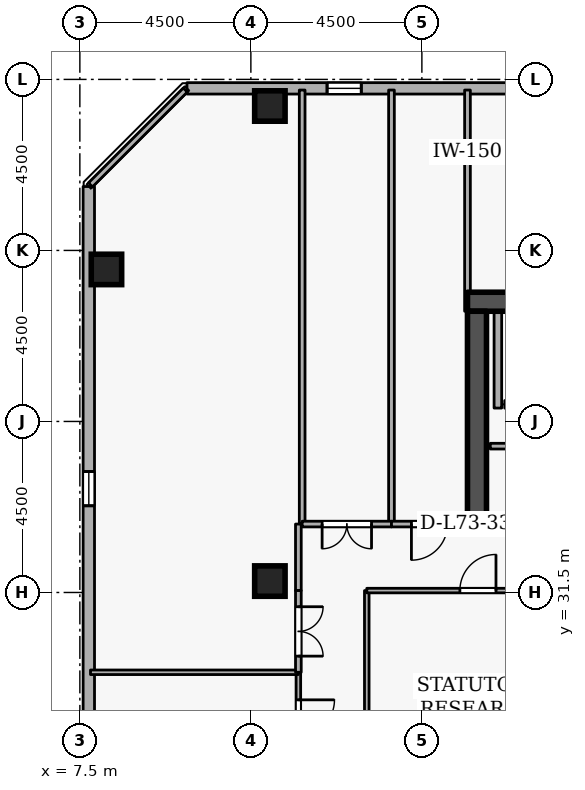
"""IFC4 building model, lengths in metres.
Left out: names, types, materials, properties, quantities, classifications, styles, units other than length and angle.
Written with IfcOpenShell. Run it as: python <this file> out.ifc"""

import sys

from ifc_helpers import new_model, si_unit, direction, frame, frame_2d, origin, origin_2d, place, context, subcontext, project, spatial, rectangle, extrude, element, fill, save


model = new_model("IFC4")
c1 = context("Model", 3, precision=1e-05, world=origin(), true_north=direction((0.0, 1.0)))
c2 = subcontext(c1, "Body", "Model", "MODEL_VIEW")
j1 = project(units=[si_unit("LENGTHUNIT", "METRE"), si_unit("PLANEANGLEUNIT", "RADIAN")], contexts=[c1])
p1 = place(None, origin())
s1 = spatial("IfcSite", under=j1, at=p1, CompositionType="ELEMENT")
p2 = place(p1, origin())
s2 = spatial("IfcBuilding", under=s1, at=p2, CompositionType="ELEMENT")
p3 = place(p2, frame((0.0, 0.0, 272.7)))
s3 = spatial("IfcBuildingStorey", under=s2, at=p3, CompositionType="ELEMENT", Elevation=272.7)
p4 = place(p3, frame((17.7, 39.15, 0.0), z_axis=(0.0, 0.0, 1.0), x_axis=(1.0, 0.0, 0.0)))
e1 = element("IfcWall", 1, at=p4, inside=s3, PredefinedType="SHEAR", context=c2, shape_type="SweptSolid", body=[
    extrude(rectangle(XDim=15.6, YDim=0.5, at=frame_2d((7.8, 0.0))), origin(), (0.0, 0.0, 1.0), 3.6),
])
p5 = place(p3, frame((17.95, 33.1, 0.0), z_axis=(0.0, 0.0, 1.0), x_axis=(0.0, 1.0, 0.0)))
e2 = element("IfcWall", 2, at=p5, inside=s3, PredefinedType="SHEAR", context=c2, shape_type="SweptSolid", body=[
    extrude(rectangle(XDim=5.8, YDim=0.5, at=frame_2d((2.9, 0.0))), origin(), (0.0, 0.0, 1.0), 3.6),
])
for number, where, z_axis, x_axis in (
    (3, (12.5, 44.3, 0.0), (0.0, 0.0, 1.0), (1.0, 0.0, 0.0)),
    (4, (8.2, 40.0, 0.0), (0.0, 0.0, 1.0), (1.0, 0.0, 0.0)),
    (5, (12.5, 31.8, 0.0), (0.0, 0.0, 1.0), (1.0, 0.0, 0.0)),
):
    element("IfcColumn", number, at=place(p3, frame(where, z_axis=z_axis, x_axis=x_axis)), inside=s3, PredefinedType="COLUMN", context=c2, shape_type="SweptSolid", body=[
        extrude(rectangle(XDim=0.8, YDim=0.8, at=origin_2d()), origin(), (0.0, 0.0, 1.0), 3.6),
    ])
p6 = place(p3, frame((46.406, 44.764, 0.0), z_axis=(0.0, 0.0, 1.0), x_axis=(-0.999999999634, 2.7061402e-05, 0.0)))
e6 = element("IfcWall", 6, at=p6, inside=s3, PredefinedType="STANDARD", context=c2, shape_type="SweptSolid", body=[
    extrude(rectangle(XDim=36.087, YDim=0.3, at=frame_2d((18.043, 0.0))), origin(), (0.0, 0.0, 1.0), 2.7),
])
p7 = place(p6, frame((2.7, 0.0, 0.72)))
e7 = element("IfcOpeningElement", 7, at=p7, cuts=e6, PredefinedType="OPENING", context=c2, shape_type="SweptSolid", body=[
    extrude(rectangle(XDim=0.9, YDim=1.75, at=frame_2d((0.45, 0.875))), frame((0.0, 0.16, 0.0), z_axis=(0.0, -1.0, 0.0), x_axis=(1.0, 0.0, 0.0)), (0.0, 0.0, 1.0), 0.32),
])
p8 = place(p6, frame((12.3, 0.0, 0.72)))
e8 = element("IfcOpeningElement", 8, at=p8, cuts=e6, PredefinedType="OPENING", context=c2, shape_type="SweptSolid", body=[
    extrude(rectangle(XDim=0.9, YDim=1.75, at=frame_2d((0.45, 0.875))), frame((0.0, 0.16, 0.0), z_axis=(0.0, -1.0, 0.0), x_axis=(1.0, 0.0, 0.0)), (0.0, 0.0, 1.0), 0.32),
])
p9 = place(p6, frame((17.1, 0.0, 0.72)))
e9 = element("IfcOpeningElement", 9, at=p9, cuts=e6, PredefinedType="OPENING", context=c2, shape_type="SweptSolid", body=[
    extrude(rectangle(XDim=0.9, YDim=1.75, at=frame_2d((0.45, 0.875))), frame((0.0, 0.16, 0.0), z_axis=(0.0, -1.0, 0.0), x_axis=(1.0, 0.0, 0.0)), (0.0, 0.0, 1.0), 0.32),
])
p10 = place(p6, frame((26.7, 0.0, 0.72)))
e10 = element("IfcOpeningElement", 10, at=p10, cuts=e6, PredefinedType="OPENING", context=c2, shape_type="SweptSolid", body=[
    extrude(rectangle(XDim=0.9, YDim=1.75, at=frame_2d((0.45, 0.875))), frame((0.0, 0.16, 0.0), z_axis=(0.0, -1.0, 0.0), x_axis=(1.0, 0.0, 0.0)), (0.0, 0.0, 1.0), 0.32),
])
p11 = place(p6, frame((31.5, 0.0, 0.72)))
e11 = element("IfcOpeningElement", 11, at=p11, cuts=e6, PredefinedType="OPENING", context=c2, shape_type="SweptSolid", body=[
    extrude(rectangle(XDim=0.9, YDim=1.75, at=frame_2d((0.45, 0.875))), frame((0.0, 0.16, 0.0), z_axis=(0.0, -1.0, 0.0), x_axis=(1.0, 0.0, 0.0)), (0.0, 0.0, 1.0), 0.32),
])
p12 = place(p3, frame((7.735, 42.181, 0.0), z_axis=(0.0, 0.0, 1.0), x_axis=(2.7061402e-05, -0.999999999634, 0.0)))
e12 = element("IfcWall", 12, at=p12, inside=s3, PredefinedType="STANDARD", context=c2, shape_type="SweptSolid", body=[
    extrude(rectangle(XDim=36.087, YDim=0.3, at=frame_2d((18.043, 0.0))), origin(), (0.0, 0.0, 1.0), 2.7),
])
p13 = place(p12, frame((7.5, 0.0, 0.72)))
e13 = element("IfcOpeningElement", 13, at=p13, cuts=e12, PredefinedType="OPENING", context=c2, shape_type="SweptSolid", body=[
    extrude(rectangle(XDim=0.9, YDim=1.75, at=frame_2d((0.45, 0.875))), frame((0.0, 0.16, 0.0), z_axis=(0.0, -1.0, 0.0), x_axis=(1.0, 0.0, 0.0)), (0.0, 0.0, 1.0), 0.32),
])
p14 = place(p12, frame((21.9, 0.0, 0.72)))
e14 = element("IfcOpeningElement", 14, at=p14, cuts=e12, PredefinedType="OPENING", context=c2, shape_type="SweptSolid", body=[
    extrude(rectangle(XDim=0.9, YDim=1.75, at=frame_2d((0.45, 0.875))), frame((0.0, 0.16, 0.0), z_axis=(0.0, -1.0, 0.0), x_axis=(1.0, 0.0, 0.0)), (0.0, 0.0, 1.0), 0.32),
])
p15 = place(p12, frame((31.5, 0.0, 0.72)))
e15 = element("IfcOpeningElement", 15, at=p15, cuts=e12, PredefinedType="OPENING", context=c2, shape_type="SweptSolid", body=[
    extrude(rectangle(XDim=0.9, YDim=1.75, at=frame_2d((0.45, 0.875))), frame((0.0, 0.16, 0.0), z_axis=(0.0, -1.0, 0.0), x_axis=(1.0, 0.0, 0.0)), (0.0, 0.0, 1.0), 0.32),
])
p16 = place(p3, frame((20.62, 36.45, 0.0), z_axis=(0.0, 0.0, 1.0), x_axis=(-1.0, 0.0, 0.0)))
e16 = element("IfcWall", 16, at=p16, inside=s3, PredefinedType="STANDARD", context=c2, shape_type="SweptSolid", body=[
    extrude(rectangle(XDim=1.94, YDim=0.2, at=frame_2d((0.97, 0.0))), origin(), (0.0, 0.0, 1.0), 3.34),
])
p17 = place(p16, frame((0.46, 0.0, 0.0)))
e17 = element("IfcOpeningElement", 17, at=p17, cuts=e16, PredefinedType="OPENING", context=c2, shape_type="SweptSolid", body=[
    extrude(rectangle(XDim=1.02, YDim=2.06, at=frame_2d((0.51, 1.03))), frame((0.0, 0.11, 0.0), z_axis=(0.0, -1.0, 0.0), x_axis=(1.0, 0.0, 0.0)), (0.0, 0.0, 1.0), 0.22),
])
p18 = place(p3, frame((18.5, 36.352, 0.0), z_axis=(0.0, 0.0, 1.0), x_axis=(0.0, 1.0, 0.0)))
e18 = element("IfcWall", 18, at=p18, inside=s3, PredefinedType="STANDARD", context=c2, shape_type="SweptSolid", body=[
    extrude(rectangle(XDim=2.536, YDim=0.2, at=frame_2d((1.268, 0.0))), origin(), (0.0, 0.0, 1.0), 3.34),
])
p19 = place(p3, frame((18.3, 33.3, 0.0), z_axis=(0.0, 0.0, 1.0), x_axis=(1.0, 0.0, 0.0)))
e19 = element("IfcWall", 19, at=p19, inside=s3, PredefinedType="PARTITIONING", context=c2, shape_type="SweptSolid", body=[
    extrude(rectangle(XDim=2.25, YDim=0.15, at=frame_2d((1.125, 0.0))), origin(), (0.0, 0.0, 1.0), 3.34),
])
p20 = place(p19, frame((0.665, 0.0, 0.0)))
e20 = element("IfcOpeningElement", 20, at=p20, cuts=e19, PredefinedType="OPENING", context=c2, shape_type="SweptSolid", body=[
    extrude(rectangle(XDim=0.92, YDim=2.08, at=frame_2d((0.46, 1.04))), frame((0.0, 0.085, 0.0), z_axis=(0.0, -1.0, 0.0), x_axis=(1.0, 0.0, 0.0)), (0.0, 0.0, 1.0), 0.17),
])
p21 = place(p3, frame((20.55, 35.35, 0.0), z_axis=(0.0, 0.0, 1.0), x_axis=(-1.0, 0.0, 0.0)))
e21 = element("IfcWall", 21, at=p21, inside=s3, PredefinedType="PARTITIONING", context=c2, shape_type="SweptSolid", body=[
    extrude(rectangle(XDim=2.25, YDim=0.15, at=frame_2d((1.125, 0.0))), origin(), (0.0, 0.0, 1.0), 3.34),
])
for number, where, z_axis, x_axis in (
    (22, (13.35, 33.3, 0.0), (0.0, 0.0, 1.0), (0.0, 1.0, 0.0)),
    (23, (15.7, 44.72, 0.0), (0.0, 0.0, 1.0), (0.0, -1.0, 0.0)),
):
    element("IfcWall", number, at=place(p3, frame(where, z_axis=z_axis, x_axis=x_axis)), inside=s3, PredefinedType="PARTITIONING", context=c2, shape_type="SweptSolid", body=[
        extrude(rectangle(XDim=11.42, YDim=0.15, at=frame_2d((5.71, 0.0))), origin(), (0.0, 0.0, 1.0), 3.34),
    ])
p22 = place(p3, frame((15.7, 33.3, 0.0), z_axis=(0.0, 0.0, 1.0), x_axis=(-1.0, 0.0, 0.0)))
e24 = element("IfcWall", 24, at=p22, inside=s3, PredefinedType="PARTITIONING", context=c2, shape_type="SweptSolid", body=[
    extrude(rectangle(XDim=2.35, YDim=0.15, at=frame_2d((1.175, 0.0))), origin(), (0.0, 0.0, 1.0), 3.34),
])
p23 = place(p22, frame((0.525, 0.0, 0.0)))
e25 = element("IfcOpeningElement", 25, at=p23, cuts=e24, PredefinedType="OPENING", context=c2, shape_type="SweptSolid", body=[
    extrude(rectangle(XDim=1.3, YDim=2.12, at=frame_2d((0.65, 1.06))), frame((0.0, 0.085, 0.0), z_axis=(0.0, -1.0, 0.0), x_axis=(1.0, 0.0, 0.0)), (0.0, 0.0, 1.0), 0.17),
])
p24 = place(p3, frame((17.7, 44.72, 0.0), z_axis=(0.0, 0.0, 1.0), x_axis=(0.0, -1.0, 0.0)))
e26 = element("IfcWall", 26, at=p24, inside=s3, PredefinedType="PARTITIONING", context=c2, shape_type="SweptSolid", body=[
    extrude(rectangle(XDim=5.82, YDim=0.15, at=frame_2d((2.91, 0.0))), origin(), (0.0, 0.0, 1.0), 2.545),
])
p25 = place(p3, frame((17.7, 33.3, 0.0), z_axis=(0.0, 0.0, 1.0), x_axis=(-1.0, 0.0, 0.0)))
e27 = element("IfcWall", 27, at=p25, inside=s3, PredefinedType="PARTITIONING", context=c2, shape_type="SweptSolid", body=[
    extrude(rectangle(XDim=2.0, YDim=0.15, at=frame_2d((1.0, 0.0))), origin(), (0.0, 0.0, 1.0), 3.34),
])
p26 = place(p25, frame((0.525, 0.0, 0.0)))
e28 = element("IfcOpeningElement", 28, at=p26, cuts=e27, PredefinedType="OPENING", context=c2, shape_type="SweptSolid", body=[
    extrude(rectangle(XDim=0.95, YDim=2.1, at=frame_2d((0.475, 1.05))), frame((0.0, 0.085, 0.0), z_axis=(0.0, -1.0, 0.0), x_axis=(1.0, 0.0, 0.0)), (0.0, 0.0, 1.0), 0.17),
])
p27 = place(p3, frame((13.25, 29.4, 0.0), z_axis=(0.0, 0.0, 1.0), x_axis=(0.0, -1.0, 0.0)))
e29 = element("IfcWall", 29, at=p27, inside=s3, PredefinedType="PARTITIONING", context=c2, shape_type="SweptSolid", body=[
    extrude(rectangle(XDim=2.4, YDim=0.12, at=frame_2d((1.2, 0.0))), origin(), (0.0, 0.0, 1.0), 3.34),
])
p28 = place(p27, frame((0.725, 0.0, 0.0)))
e30 = element("IfcOpeningElement", 30, at=p28, cuts=e29, PredefinedType="OPENING", context=c2, shape_type="SweptSolid", body=[
    extrude(rectangle(XDim=0.95, YDim=2.1, at=frame_2d((0.475, 1.05))), frame((0.0, 0.07, 0.0), z_axis=(0.0, -1.0, 0.0), x_axis=(1.0, 0.0, 0.0)), (0.0, 0.0, 1.0), 0.14),
])
p29 = place(p3, frame((7.78, 29.4, 0.0), z_axis=(0.0, 0.0, 1.0), x_axis=(1.0, 0.0, 0.0)))
e31 = element("IfcWall", 31, at=p29, inside=s3, PredefinedType="PARTITIONING", context=c2, shape_type="SweptSolid", body=[
    extrude(rectangle(XDim=5.47, YDim=0.12, at=frame_2d((2.735, 0.0))), origin(), (0.0, 0.0, 1.0), 3.34),
])
p30 = place(p3, frame((7.78, 42.225, 0.0), z_axis=(0.0, 0.0, 1.0), x_axis=(0.707106781187, 0.707106781187, 0.0)))
e32 = element("IfcWall", 32, at=p30, inside=s3, PredefinedType="PARTITIONING", context=c2, shape_type="SweptSolid", body=[
    extrude(rectangle(XDim=3.528, YDim=0.15, at=frame_2d((1.764, 0.0))), origin(), (0.0, 0.0, 1.0), 3.34),
])
p31 = place(p3, frame((13.25, 33.3, 0.0), z_axis=(0.0, 0.0, 1.0), x_axis=(0.0, -1.0, 0.0)))
e33 = element("IfcWall", 33, at=p31, inside=s3, PredefinedType="PARTITIONING", context=c2, shape_type="SweptSolid", body=[
    extrude(rectangle(XDim=1.75, YDim=0.15, at=frame_2d((0.875, 0.0))), origin(), (0.0, 0.0, 1.0), 3.34),
])
p32 = place(p3, frame((13.25, 31.55, 0.0), z_axis=(0.0, 0.0, 1.0), x_axis=(0.0, -1.0, 0.0)))
e34 = element("IfcWall", 34, at=p32, inside=s3, PredefinedType="PARTITIONING", context=c2, shape_type="SweptSolid", body=[
    extrude(rectangle(XDim=2.15, YDim=0.15, at=frame_2d((1.075, 0.0))), origin(), (0.0, 0.0, 1.0), 3.34),
])
p33 = place(p32, frame((0.425, 0.0, 0.0)))
e35 = element("IfcOpeningElement", 35, at=p33, cuts=e34, PredefinedType="OPENING", context=c2, shape_type="SweptSolid", body=[
    extrude(rectangle(XDim=1.3, YDim=2.12, at=frame_2d((0.65, 1.06))), frame((0.0, 0.085, 0.0), z_axis=(0.0, -1.0, 0.0), x_axis=(1.0, 0.0, 0.0)), (0.0, 0.0, 1.0), 0.17),
])
p34 = place(p3, frame((15.05, 26.2, 0.0), z_axis=(0.0, 0.0, 1.0), x_axis=(0.0, 1.0, 0.0)))
e36 = element("IfcWall", 36, at=p34, inside=s3, PredefinedType="PARTITIONING", context=c2, shape_type="SweptSolid", body=[
    extrude(rectangle(XDim=5.35, YDim=0.12, at=frame_2d((2.675, 0.0))), origin(), (0.0, 0.0, 1.0), 3.34),
])
p35 = place(p3, frame((15.05, 31.55, 0.0), z_axis=(0.0, 0.0, 1.0), x_axis=(1.0, 0.0, 0.0)))
e37 = element("IfcWall", 37, at=p35, inside=s3, PredefinedType="PARTITIONING", context=c2, shape_type="SweptSolid", body=[
    extrude(rectangle(XDim=5.85, YDim=0.12, at=frame_2d((2.925, 0.0))), origin(), (0.0, 0.0, 1.0), 3.34),
])
p36 = place(p35, frame((2.45, 0.0, 0.0)))
e38 = element("IfcOpeningElement", 38, at=p36, cuts=e37, PredefinedType="OPENING", context=c2, shape_type="SweptSolid", body=[
    extrude(rectangle(XDim=0.95, YDim=2.1, at=frame_2d((0.475, 1.05))), frame((0.0, 0.07, 0.0), z_axis=(0.0, -1.0, 0.0), x_axis=(1.0, 0.0, 0.0)), (0.0, 0.0, 1.0), 0.14),
])
p37 = place(p11, origin())
e39 = element("IfcWindow", 39, at=p37, inside=s3, PartitioningType="SINGLE_PANEL", PredefinedType="WINDOW", context=c2, shape_type="SweptSolid", body=[
    extrude(rectangle(XDim=0.9, YDim=1.75, at=frame_2d((0.45, 0.875))), frame((0.0, 0.03, 0.0), z_axis=(0.0, -1.0, 0.0), x_axis=(1.0, 0.0, 0.0)), (0.0, 0.0, 1.0), 0.06),
])
fill(e11, e39)
p38 = place(p13, origin())
e40 = element("IfcWindow", 40, at=p38, inside=s3, PartitioningType="SINGLE_PANEL", PredefinedType="WINDOW", context=c2, shape_type="SweptSolid", body=[
    extrude(rectangle(XDim=0.9, YDim=1.75, at=frame_2d((0.45, 0.875))), frame((0.0, 0.03, 0.0), z_axis=(0.0, -1.0, 0.0), x_axis=(1.0, 0.0, 0.0)), (0.0, 0.0, 1.0), 0.06),
])
fill(e13, e40)
p39 = place(p23, origin())
e41 = element("IfcDoor", 41, at=p39, inside=s3, OperationType="DOUBLE_DOOR_SINGLE_SWING", PredefinedType="DOOR", context=c2, shape_type="SweptSolid", body=[
    extrude(rectangle(XDim=1.3, YDim=2.12, at=frame_2d((0.65, 1.06))), frame((0.0, 0.025, 0.0), z_axis=(0.0, -1.0, 0.0), x_axis=(1.0, 0.0, 0.0)), (0.0, 0.0, 1.0), 0.05),
])
fill(e25, e41)
p40 = place(p26, origin())
e42 = element("IfcDoor", 42, at=p40, inside=s3, OperationType="SINGLE_SWING_RIGHT", PredefinedType="DOOR", context=c2, shape_type="SweptSolid", body=[
    extrude(rectangle(XDim=0.95, YDim=2.1, at=frame_2d((0.475, 1.05))), frame((0.0, 0.025, 0.0), z_axis=(0.0, -1.0, 0.0), x_axis=(1.0, 0.0, 0.0)), (0.0, 0.0, 1.0), 0.05),
])
fill(e28, e42)
p41 = place(p28, origin())
e43 = element("IfcDoor", 43, at=p41, inside=s3, OperationType="SINGLE_SWING_LEFT", PredefinedType="DOOR", context=c2, shape_type="SweptSolid", body=[
    extrude(rectangle(XDim=0.95, YDim=2.1, at=frame_2d((0.475, 1.05))), frame((0.0, 0.025, 0.0), z_axis=(0.0, -1.0, 0.0), x_axis=(1.0, 0.0, 0.0)), (0.0, 0.0, 1.0), 0.05),
])
fill(e30, e43)
p42 = place(p33, origin())
e44 = element("IfcDoor", 44, at=p42, inside=s3, OperationType="DOUBLE_DOOR_SINGLE_SWING", PredefinedType="DOOR", context=c2, shape_type="SweptSolid", body=[
    extrude(rectangle(XDim=1.3, YDim=2.12, at=frame_2d((0.65, 1.06))), frame((0.0, 0.025, 0.0), z_axis=(0.0, -1.0, 0.0), x_axis=(1.0, 0.0, 0.0)), (0.0, 0.0, 1.0), 0.05),
])
fill(e35, e44)
p43 = place(p36, origin())
e45 = element("IfcDoor", 45, at=p43, inside=s3, OperationType="SINGLE_SWING_RIGHT", PredefinedType="DOOR", context=c2, shape_type="SweptSolid", body=[
    extrude(rectangle(XDim=0.95, YDim=2.1, at=frame_2d((0.475, 1.05))), frame((0.0, 0.025, 0.0), z_axis=(0.0, -1.0, 0.0), x_axis=(1.0, 0.0, 0.0)), (0.0, 0.0, 1.0), 0.05),
])
fill(e38, e45)
save(model, sys.argv[1])
